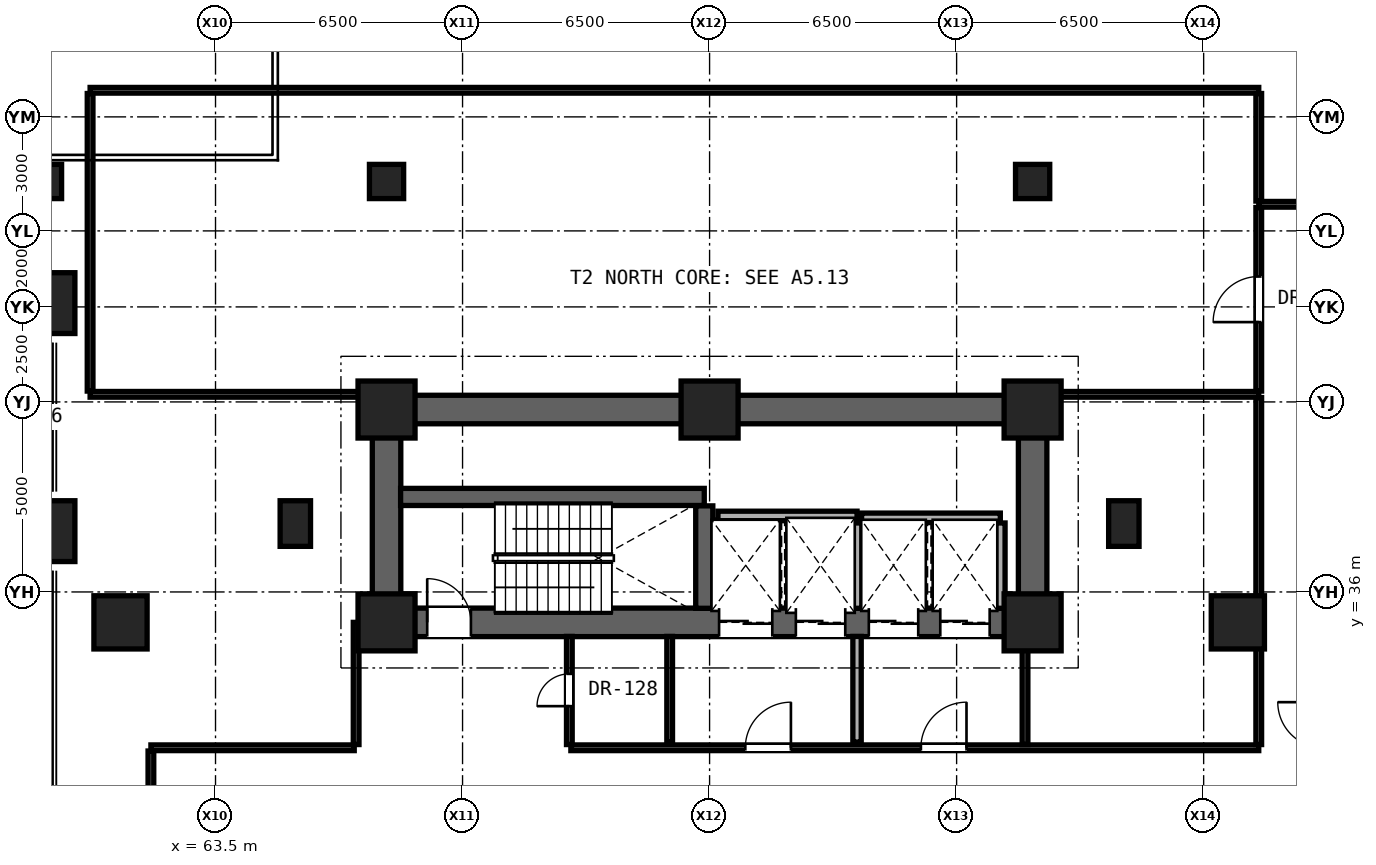
"""IFC4 building model, lengths in metres.
Left out: names, types, materials, properties, quantities, classifications, styles, units other than length and angle.
Written with IfcOpenShell. Run it as: python <this file> out.ifc"""

import sys

from ifc_helpers import new_model, si_unit, direction, frame, frame_2d, origin, origin_2d, place, context, subcontext, project, spatial, rectangle, hollow_rectangle, extrude, element, fill, save


model = new_model("IFC4")
c1 = context("Model", 3, precision=1e-05, world=origin(), true_north=direction((0.0, 1.0)))
c2 = subcontext(c1, "Body", "Model", "MODEL_VIEW")
j1 = project(units=[si_unit("LENGTHUNIT", "METRE"), si_unit("PLANEANGLEUNIT", "RADIAN")], contexts=[c1])
p1 = place(None, origin())
s1 = spatial("IfcSite", under=j1, at=p1, CompositionType="ELEMENT")
p2 = place(p1, origin())
s2 = spatial("IfcBuilding", under=s1, at=p2, CompositionType="ELEMENT")
p3 = place(p2, frame((0.0, 0.0, 9.5)))
s3 = spatial("IfcBuildingStorey", under=s2, at=p3, CompositionType="ELEMENT", Elevation=9.5)
for number, where, z_axis, x_axis in (
    (1, (68.0, 35.2, 0.0), (0.0, 0.0, 1.0), (1.0, 0.0, 0.0)),
    (2, (85.0, 35.2, 0.0), (0.0, 0.0, 1.0), (1.0, 0.0, 0.0)),
    (3, (68.0, 40.8, 0.0), (0.0, 0.0, 1.0), (1.0, 0.0, 0.0)),
    (4, (76.5, 40.8, 0.0), (0.0, 0.0, 1.0), (1.0, 0.0, 0.0)),
    (5, (85.0, 40.8, 0.0), (0.0, 0.0, 1.0), (1.0, 0.0, 0.0)),
):
    element("IfcColumn", number, at=place(p3, frame(where, z_axis=z_axis, x_axis=x_axis)), inside=s3, PredefinedType="COLUMN", context=c2, shape_type="SweptSolid", body=[
        extrude(rectangle(XDim=1.5, YDim=1.5, at=origin_2d()), origin(), (0.0, 0.0, 1.0), 4.3),
    ])
for number, where, z_axis, x_axis in (
    (6, (61.0, 35.2, 0.0), (0.0, 0.0, 1.0), (1.0, 0.0, 0.0)),
    (7, (90.4, 35.2, 0.0), (0.0, 0.0, 1.0), (1.0, 0.0, 0.0)),
):
    element("IfcColumn", number, at=place(p3, frame(where, z_axis=z_axis, x_axis=x_axis)), inside=s3, PredefinedType="COLUMN", context=c2, shape_type="SweptSolid", body=[
        extrude(hollow_rectangle(XDim=1.4, YDim=1.4, WallThickness=0.08, at=origin_2d()), origin(), (0.0, 0.0, 1.0), 4.3),
    ])
for number, where, z_axis, x_axis in (
    (8, (65.6, 37.8, 0.0), (0.0, 0.0, 1.0), (1.0, 0.0, 0.0)),
    (9, (87.4, 37.8, 0.0), (0.0, 0.0, 1.0), (1.0, 0.0, 0.0)),
):
    element("IfcColumn", number, at=place(p3, frame(where, z_axis=z_axis, x_axis=x_axis)), inside=s3, PredefinedType="PILASTER", context=c2, shape_type="SweptSolid", body=[
        extrude(rectangle(XDim=0.8, YDim=1.2, at=origin_2d()), origin(), (0.0, 0.0, 1.0), 4.3),
    ])
p4 = place(p3, frame((68.0, 40.8, 0.0), z_axis=(0.0, 0.0, 1.0), x_axis=(1.0, 0.0, 0.0)))
e10 = element("IfcWall", 10, at=p4, inside=s3, PredefinedType="SHEAR", context=c2, shape_type="SweptSolid", body=[
    extrude(rectangle(XDim=17.0, YDim=0.75, at=frame_2d((8.5, 0.0))), origin(), (0.0, 0.0, 1.0), 3.98),
])
for number, where, z_axis, x_axis in (
    (11, (68.0, 35.2, 0.0), (0.0, 0.0, 1.0), (0.0, 1.0, 0.0)),
    (12, (85.0, 35.2, 0.0), (0.0, 0.0, 1.0), (0.0, 1.0, 0.0)),
):
    element("IfcWall", number, at=place(p3, frame(where, z_axis=z_axis, x_axis=x_axis)), inside=s3, PredefinedType="SHEAR", context=c2, shape_type="SweptSolid", body=[
        extrude(rectangle(XDim=5.6, YDim=0.75, at=frame_2d((2.8, 0.0))), origin(), (0.0, 0.0, 1.0), 3.98),
    ])
p5 = place(p3, frame((68.0, 35.2, 0.0), z_axis=(0.0, 0.0, 1.0), x_axis=(1.0, 0.0, 0.0)))
e13 = element("IfcWall", 13, at=p5, inside=s3, PredefinedType="SHEAR", context=c2, shape_type="SweptSolid", body=[
    extrude(rectangle(XDim=17.0, YDim=0.75, at=frame_2d((8.5, 0.0))), origin(), (0.0, 0.0, 1.0), 3.98),
])
p6 = place(p5, frame((1.07, 0.0, 0.0)))
e14 = element("IfcOpeningElement", 14, at=p6, cuts=e13, PredefinedType="OPENING", context=c2, shape_type="SweptSolid", body=[
    extrude(rectangle(XDim=1.15, YDim=2.2, at=frame_2d((0.575, 1.1))), frame((0.0, 0.385, 0.0), z_axis=(0.0, -1.0, 0.0), x_axis=(1.0, 0.0, 0.0)), (0.0, 0.0, 1.0), 0.77),
])
p7 = place(p5, frame((8.75, 0.0, 0.0)))
e15 = element("IfcOpeningElement", 15, at=p7, cuts=e13, PredefinedType="OPENING", context=c2, shape_type="SweptSolid", body=[
    extrude(rectangle(XDim=1.4, YDim=2.35, at=frame_2d((0.7, 1.175))), frame((0.0, 0.385, 0.0), z_axis=(0.0, -1.0, 0.0), x_axis=(1.0, 0.0, 0.0)), (0.0, 0.0, 1.0), 0.77),
])
p8 = place(p5, frame((10.77, 0.0, 0.0)))
e16 = element("IfcOpeningElement", 16, at=p8, cuts=e13, PredefinedType="OPENING", context=c2, shape_type="SweptSolid", body=[
    extrude(rectangle(XDim=1.3, YDim=2.3, at=frame_2d((0.65, 1.15))), frame((0.0, 0.385, 0.0), z_axis=(0.0, -1.0, 0.0), x_axis=(1.0, 0.0, 0.0)), (0.0, 0.0, 1.0), 0.77),
])
p9 = place(p5, frame((12.69, 0.0, 0.0)))
e17 = element("IfcOpeningElement", 17, at=p9, cuts=e13, PredefinedType="OPENING", context=c2, shape_type="SweptSolid", body=[
    extrude(rectangle(XDim=1.3, YDim=2.3, at=frame_2d((0.65, 1.15))), frame((0.0, 0.385, 0.0), z_axis=(0.0, -1.0, 0.0), x_axis=(1.0, 0.0, 0.0)), (0.0, 0.0, 1.0), 0.77),
])
p10 = place(p5, frame((14.57, 0.0, 0.0)))
e18 = element("IfcOpeningElement", 18, at=p10, cuts=e13, PredefinedType="OPENING", context=c2, shape_type="SweptSolid", body=[
    extrude(rectangle(XDim=1.3, YDim=2.3, at=frame_2d((0.65, 1.15))), frame((0.0, 0.385, 0.0), z_axis=(0.0, -1.0, 0.0), x_axis=(1.0, 0.0, 0.0)), (0.0, 0.0, 1.0), 0.77),
])
for number, where, z_axis, x_axis in (
    (19, (59.0, 37.6, 0.0), (0.0, 0.0, 1.0), (1.0, 0.0, 0.0)),
    (20, (59.0, 43.6, 0.0), (0.0, 0.0, 1.0), (1.0, 0.0, 0.0)),
):
    element("IfcColumn", number, at=place(p3, frame(where, z_axis=z_axis, x_axis=x_axis)), inside=s3, PredefinedType="COLUMN", context=c2, shape_type="SweptSolid", body=[
        extrude(rectangle(XDim=1.6, YDim=1.6, at=origin_2d()), origin(), (0.0, 0.0, 1.0), 4.3),
    ])
for number, where, z_axis, x_axis in (
    (21, (59.0, 46.8, 0.0), (0.0, 0.0, 1.0), (1.0, 0.0, 0.0)),
    (22, (68.0, 46.8, 0.0), (0.0, 0.0, 1.0), (1.0, 0.0, 0.0)),
    (23, (85.0, 46.8, 0.0), (0.0, 0.0, 1.0), (1.0, 0.0, 0.0)),
):
    element("IfcColumn", number, at=place(p3, frame(where, z_axis=z_axis, x_axis=x_axis)), inside=s3, PredefinedType="COLUMN", context=c2, shape_type="SweptSolid", body=[
        extrude(rectangle(XDim=0.9, YDim=0.9, at=origin_2d()), origin(), (0.0, 0.0, 1.0), 4.3),
    ])
p11 = place(p3, frame((61.8, 31.9, 0.0), z_axis=(0.0, 0.0, 1.0), x_axis=(1.0, 0.0, 0.0)))
e24 = element("IfcWall", 24, at=p11, inside=s3, PredefinedType="PARTITIONING", context=c2, shape_type="SweptSolid", body=[
    extrude(rectangle(XDim=5.35, YDim=0.15, at=frame_2d((2.675, 0.0))), origin(), (0.0, 0.0, 1.0), 3.98),
])
p12 = place(p3, frame((72.85, 31.9, 0.0), z_axis=(0.0, 0.0, 1.0), x_axis=(1.0, 0.0, 0.0)))
e25 = element("IfcWall", 25, at=p12, inside=s3, PredefinedType="PARTITIONING", context=c2, shape_type="SweptSolid", body=[
    extrude(rectangle(XDim=18.1, YDim=0.15, at=frame_2d((9.05, 0.0))), origin(), (0.0, 0.0, 1.0), 3.045),
])
p13 = place(p12, frame((9.21, 0.0, 0.0)))
e26 = element("IfcOpeningElement", 26, at=p13, cuts=e25, PredefinedType="OPENING", context=c2, shape_type="SweptSolid", body=[
    extrude(rectangle(XDim=1.2, YDim=2.25, at=frame_2d((0.6, 1.125))), frame((0.0, 0.085, 0.0), z_axis=(0.0, -1.0, 0.0), x_axis=(1.0, 0.0, 0.0)), (0.0, 0.0, 1.0), 0.17),
])
p14 = place(p12, frame((4.59, 0.0, 0.0)))
e27 = element("IfcOpeningElement", 27, at=p14, cuts=e25, PredefinedType="OPENING", context=c2, shape_type="SweptSolid", body=[
    extrude(rectangle(XDim=1.2, YDim=2.25, at=frame_2d((0.6, 1.125))), frame((0.0, 0.085, 0.0), z_axis=(0.0, -1.0, 0.0), x_axis=(1.0, 0.0, 0.0)), (0.0, 0.0, 1.0), 0.17),
])
p15 = place(p3, frame((80.5, 37.95, 0.0), z_axis=(0.0, 0.0, 1.0), x_axis=(1.0, 0.0, 0.0)))
e28 = element("IfcWall", 28, at=p15, inside=s3, PredefinedType="SOLIDWALL", context=c2, shape_type="SweptSolid", body=[
    extrude(rectangle(XDim=3.65, YDim=0.25, at=frame_2d((1.825, 0.0))), origin(), (0.0, 0.0, 1.0), 3.98),
])
p16 = place(p3, frame((76.72, 38.0, 0.0), z_axis=(0.0, 0.0, 1.0), x_axis=(1.0, 0.0, 0.0)))
e29 = element("IfcWall", 29, at=p16, inside=s3, PredefinedType="SOLIDWALL", context=c2, shape_type="SweptSolid", body=[
    extrude(rectangle(XDim=3.66, YDim=0.25, at=frame_2d((1.83, 0.0))), origin(), (0.0, 0.0, 1.0), 3.98),
])
p17 = place(p3, frame((68.37, 38.5, 0.0), z_axis=(0.0, 0.0, 1.0), x_axis=(1.0, 0.0, 0.0)))
e30 = element("IfcWall", 30, at=p17, inside=s3, PredefinedType="SHEAR", context=c2, shape_type="SweptSolid", body=[
    extrude(rectangle(XDim=7.99, YDim=0.45, at=frame_2d((3.995, 0.0))), origin(), (0.0, 0.0, 1.0), 3.98),
])
p18 = place(p3, frame((60.2, 41.2, 0.0), z_axis=(0.0, 0.0, 1.0), x_axis=(1.0, 0.0, 0.0)))
e31 = element("IfcWall", 31, at=p18, inside=s3, PredefinedType="PARTITIONING", context=c2, shape_type="SweptSolid", body=[
    extrude(rectangle(XDim=7.78, YDim=0.15, at=frame_2d((3.89, 0.0))), origin(), (0.0, 0.0, 1.0), 3.024),
])
p19 = place(p3, frame((85.02, 41.2, 0.0), z_axis=(0.0, 0.0, 1.0), x_axis=(1.0, 0.0, 0.0)))
e32 = element("IfcWall", 32, at=p19, inside=s3, PredefinedType="PARTITIONING", context=c2, shape_type="SweptSolid", body=[
    extrude(rectangle(XDim=5.93, YDim=0.15, at=frame_2d((2.965, 0.0))), origin(), (0.0, 0.0, 1.0), 3.116),
])
p20 = place(p3, frame((90.95, 46.2, 0.0), z_axis=(0.0, 0.0, 1.0), x_axis=(1.0, 0.0, 0.0)))
e33 = element("IfcWall", 33, at=p20, inside=s3, PredefinedType="PARTITIONING", context=c2, shape_type="SweptSolid", body=[
    extrude(rectangle(XDim=1.7, YDim=0.15, at=frame_2d((0.85, 0.0))), origin(), (0.0, 0.0, 1.0), 3.98),
])
p21 = place(p3, frame((60.2, 49.2, 0.0), z_axis=(0.0, 0.0, 1.0), x_axis=(1.0, 0.0, 0.0)))
e34 = element("IfcWall", 34, at=p21, inside=s3, PredefinedType="PARTITIONING", context=c2, shape_type="SweptSolid", body=[
    extrude(rectangle(XDim=30.75, YDim=0.15, at=frame_2d((15.375, 0.0))), origin(), (0.0, 0.0, 1.0), 3.98),
])
p22 = place(p3, frame((60.2, 41.285, 0.0), z_axis=(0.0, 0.0, 1.0), x_axis=(0.0, 1.0, 0.0)))
e35 = element("IfcWall", 35, at=p22, inside=s3, PredefinedType="PARTITIONING", context=c2, shape_type="SweptSolid", body=[
    extrude(rectangle(XDim=7.83, YDim=0.15, at=frame_2d((3.915, 0.0))), origin(), (0.0, 0.0, 1.0), 3.024),
])
p23 = place(p3, frame((61.8, 29.485, 0.0), z_axis=(0.0, 0.0, 1.0), x_axis=(0.0, 1.0, 0.0)))
e36 = element("IfcWall", 36, at=p23, inside=s3, PredefinedType="PARTITIONING", context=c2, shape_type="SweptSolid", body=[
    extrude(rectangle(XDim=2.33, YDim=0.15, at=frame_2d((1.165, 0.0))), origin(), (0.0, 0.0, 1.0), 3.98),
])
p24 = place(p3, frame((67.2, 31.985, 0.0), z_axis=(0.0, 0.0, 1.0), x_axis=(0.0, 1.0, 0.0)))
e37 = element("IfcWall", 37, at=p24, inside=s3, PredefinedType="PARTITIONING", context=c2, shape_type="SweptSolid", body=[
    extrude(rectangle(XDim=3.215, YDim=0.15, at=frame_2d((1.607, 0.0))), origin(), (0.0, 0.0, 1.0), 2.872),
])
p25 = place(p3, frame((72.81, 31.985, 0.0), z_axis=(0.0, 0.0, 1.0), x_axis=(0.0, 1.0, 0.0)))
e38 = element("IfcWall", 38, at=p25, inside=s3, PredefinedType="PARTITIONING", context=c2, shape_type="SweptSolid", body=[
    extrude(rectangle(XDim=2.845, YDim=0.15, at=frame_2d((1.422, 0.0))), origin(), (0.0, 0.0, 1.0), 3.98),
])
p26 = place(p25, frame((1.01, 0.0, 0.0)))
e39 = element("IfcOpeningElement", 39, at=p26, cuts=e38, PredefinedType="OPENING", context=c2, shape_type="SweptSolid", body=[
    extrude(rectangle(XDim=0.85, YDim=2.01, at=frame_2d((0.425, 1.005))), frame((0.0, 0.085, 0.0), z_axis=(0.0, -1.0, 0.0), x_axis=(1.0, 0.0, 0.0)), (0.0, 0.0, 1.0), 0.17),
])
p27 = place(p3, frame((75.45, 32.05, 0.0), z_axis=(0.0, 0.0, 1.0), x_axis=(0.0, 1.0, 0.0)))
e40 = element("IfcWall", 40, at=p27, inside=s3, PredefinedType="PARTITIONING", context=c2, shape_type="SweptSolid", body=[
    extrude(rectangle(XDim=2.78, YDim=0.15, at=frame_2d((1.39, 0.0))), origin(), (0.0, 0.0, 1.0), 3.98),
])
p28 = place(p3, frame((76.36, 35.57, 0.0), z_axis=(0.0, 0.0, 1.0), x_axis=(0.0, 1.0, 0.0)))
e41 = element("IfcWall", 41, at=p28, inside=s3, PredefinedType="SHEAR", context=c2, shape_type="SweptSolid", body=[
    extrude(rectangle(XDim=2.695, YDim=0.45, at=frame_2d((1.347, 0.0))), origin(), (0.0, 0.0, 1.0), 3.98),
])
p29 = place(p3, frame((80.38, 32.05, 0.0), z_axis=(0.0, 0.0, 1.0), x_axis=(0.0, 1.0, 0.0)))
e42 = element("IfcWall", 42, at=p29, inside=s3, PredefinedType="SOLIDWALL", context=c2, shape_type="SweptSolid", body=[
    extrude(rectangle(XDim=2.78, YDim=0.22, at=frame_2d((1.39, 0.0))), origin(), (0.0, 0.0, 1.0), 3.98),
])
for number, where, z_axis, x_axis in (
    (43, (80.38, 35.57, 0.0), (0.0, 0.0, 1.0), (0.0, 1.0, 0.0)),
    (44, (84.15, 35.57, 0.0), (0.0, 0.0, 1.0), (0.0, 1.0, 0.0)),
):
    element("IfcWall", number, at=place(p3, frame(where, z_axis=z_axis, x_axis=x_axis)), inside=s3, PredefinedType="SOLIDWALL", context=c2, shape_type="SweptSolid", body=[
        extrude(rectangle(XDim=2.245, YDim=0.25, at=frame_2d((1.123, 0.0))), origin(), (0.0, 0.0, 1.0), 3.98),
    ])
p30 = place(p3, frame((84.8, 31.985, 0.0), z_axis=(0.0, 0.0, 1.0), x_axis=(0.0, 1.0, 0.0)))
e45 = element("IfcWall", 45, at=p30, inside=s3, PredefinedType="PARTITIONING", context=c2, shape_type="SweptSolid", body=[
    extrude(rectangle(XDim=2.845, YDim=0.15, at=frame_2d((1.422, 0.0))), origin(), (0.0, 0.0, 1.0), 3.045),
])
p31 = place(p3, frame((90.95, 31.985, 0.0), z_axis=(0.0, 0.0, 1.0), x_axis=(0.0, 1.0, 0.0)))
e46 = element("IfcWall", 46, at=p31, inside=s3, PredefinedType="PARTITIONING", context=c2, shape_type="SweptSolid", body=[
    extrude(rectangle(XDim=9.13, YDim=0.15, at=frame_2d((4.565, 0.0))), origin(), (0.0, 0.0, 1.0), 3.116),
])
p32 = place(p3, frame((90.95, 41.285, 0.0), z_axis=(0.0, 0.0, 1.0), x_axis=(0.0, 1.0, 0.0)))
e47 = element("IfcWall", 47, at=p32, inside=s3, PredefinedType="PARTITIONING", context=c2, shape_type="SweptSolid", body=[
    extrude(rectangle(XDim=4.83, YDim=0.15, at=frame_2d((2.415, 0.0))), origin(), (0.0, 0.0, 1.0), 3.98),
])
p33 = place(p32, frame((1.815, 0.0, 0.0)))
e48 = element("IfcOpeningElement", 48, at=p33, cuts=e47, PredefinedType="OPENING", context=c2, shape_type="SweptSolid", body=[
    extrude(rectangle(XDim=1.2, YDim=2.25, at=frame_2d((0.6, 1.125))), frame((0.0, 0.085, 0.0), z_axis=(0.0, -1.0, 0.0), x_axis=(1.0, 0.0, 0.0)), (0.0, 0.0, 1.0), 0.17),
])
p34 = place(p3, frame((90.95, 46.285, 0.0), z_axis=(0.0, 0.0, 1.0), x_axis=(0.0, 1.0, 0.0)))
e49 = element("IfcWall", 49, at=p34, inside=s3, PredefinedType="PARTITIONING", context=c2, shape_type="SweptSolid", body=[
    extrude(rectangle(XDim=2.83, YDim=0.15, at=frame_2d((1.415, 0.0))), origin(), (0.0, 0.0, 1.0), 3.98),
])
p35 = place(p13, origin())
e50 = element("IfcDoor", 50, at=p35, inside=s3, OperationType="SINGLE_SWING_RIGHT", PredefinedType="DOOR", context=c2, shape_type="SweptSolid", body=[
    extrude(rectangle(XDim=1.2, YDim=2.25, at=frame_2d((0.6, 1.125))), frame((0.0, 0.025, 0.0), z_axis=(0.0, -1.0, 0.0), x_axis=(1.0, 0.0, 0.0)), (0.0, 0.0, 1.0), 0.05),
])
fill(e26, e50)
p36 = place(p6, origin())
e51 = element("IfcDoor", 51, at=p36, inside=s3, OperationType="SINGLE_SWING_LEFT", PredefinedType="DOOR", context=c2, shape_type="SweptSolid", body=[
    extrude(rectangle(XDim=1.15, YDim=2.2, at=frame_2d((0.575, 1.1))), frame((0.0, 0.025, 0.0), z_axis=(0.0, -1.0, 0.0), x_axis=(1.0, 0.0, 0.0)), (0.0, 0.0, 1.0), 0.05),
])
fill(e14, e51)
p37 = place(p14, origin())
e52 = element("IfcDoor", 52, at=p37, inside=s3, OperationType="SINGLE_SWING_RIGHT", PredefinedType="DOOR", context=c2, shape_type="SweptSolid", body=[
    extrude(rectangle(XDim=1.2, YDim=2.25, at=frame_2d((0.6, 1.125))), frame((0.0, 0.025, 0.0), z_axis=(0.0, -1.0, 0.0), x_axis=(1.0, 0.0, 0.0)), (0.0, 0.0, 1.0), 0.05),
])
fill(e27, e52)
p38 = place(p26, origin())
e53 = element("IfcDoor", 53, at=p38, inside=s3, OperationType="SINGLE_SWING_LEFT", PredefinedType="DOOR", context=c2, shape_type="SweptSolid", body=[
    extrude(rectangle(XDim=0.85, YDim=2.01, at=frame_2d((0.425, 1.005))), frame((0.0, 0.025, 0.0), z_axis=(0.0, -1.0, 0.0), x_axis=(1.0, 0.0, 0.0)), (0.0, 0.0, 1.0), 0.05),
])
fill(e39, e53)
p39 = place(p33, origin())
e54 = element("IfcDoor", 54, at=p39, inside=s3, OperationType="SINGLE_SWING_LEFT", PredefinedType="DOOR", context=c2, shape_type="SweptSolid", body=[
    extrude(rectangle(XDim=1.2, YDim=2.25, at=frame_2d((0.6, 1.125))), frame((0.0, 0.025, 0.0), z_axis=(0.0, -1.0, 0.0), x_axis=(1.0, 0.0, 0.0)), (0.0, 0.0, 1.0), 0.05),
])
fill(e48, e54)
p40 = place(p7, origin())
e55 = element("IfcDoor", 55, at=p40, inside=s3, OperationType="DOUBLE_DOOR_SLIDING", PredefinedType="DOOR", context=c2, shape_type="SweptSolid", body=[
    extrude(rectangle(XDim=1.4, YDim=2.35, at=frame_2d((0.7, 1.175))), frame((0.0, 0.025, 0.0), z_axis=(0.0, -1.0, 0.0), x_axis=(1.0, 0.0, 0.0)), (0.0, 0.0, 1.0), 0.05),
])
fill(e15, e55)
p41 = place(p8, origin())
e56 = element("IfcDoor", 56, at=p41, inside=s3, OperationType="DOUBLE_DOOR_SLIDING", PredefinedType="DOOR", context=c2, shape_type="SweptSolid", body=[
    extrude(rectangle(XDim=1.3, YDim=2.3, at=frame_2d((0.65, 1.15))), frame((0.0, 0.025, 0.0), z_axis=(0.0, -1.0, 0.0), x_axis=(1.0, 0.0, 0.0)), (0.0, 0.0, 1.0), 0.05),
])
fill(e16, e56)
p42 = place(p9, origin())
e57 = element("IfcDoor", 57, at=p42, inside=s3, OperationType="DOUBLE_DOOR_SLIDING", PredefinedType="DOOR", context=c2, shape_type="SweptSolid", body=[
    extrude(rectangle(XDim=1.3, YDim=2.3, at=frame_2d((0.65, 1.15))), frame((0.0, 0.025, 0.0), z_axis=(0.0, -1.0, 0.0), x_axis=(1.0, 0.0, 0.0)), (0.0, 0.0, 1.0), 0.05),
])
fill(e17, e57)
p43 = place(p10, origin())
e58 = element("IfcDoor", 58, at=p43, inside=s3, OperationType="DOUBLE_DOOR_SLIDING", PredefinedType="DOOR", context=c2, shape_type="SweptSolid", body=[
    extrude(rectangle(XDim=1.3, YDim=2.3, at=frame_2d((0.65, 1.15))), frame((0.0, 0.025, 0.0), z_axis=(0.0, -1.0, 0.0), x_axis=(1.0, 0.0, 0.0)), (0.0, 0.0, 1.0), 0.05),
])
fill(e18, e58)
save(model, sys.argv[1])
